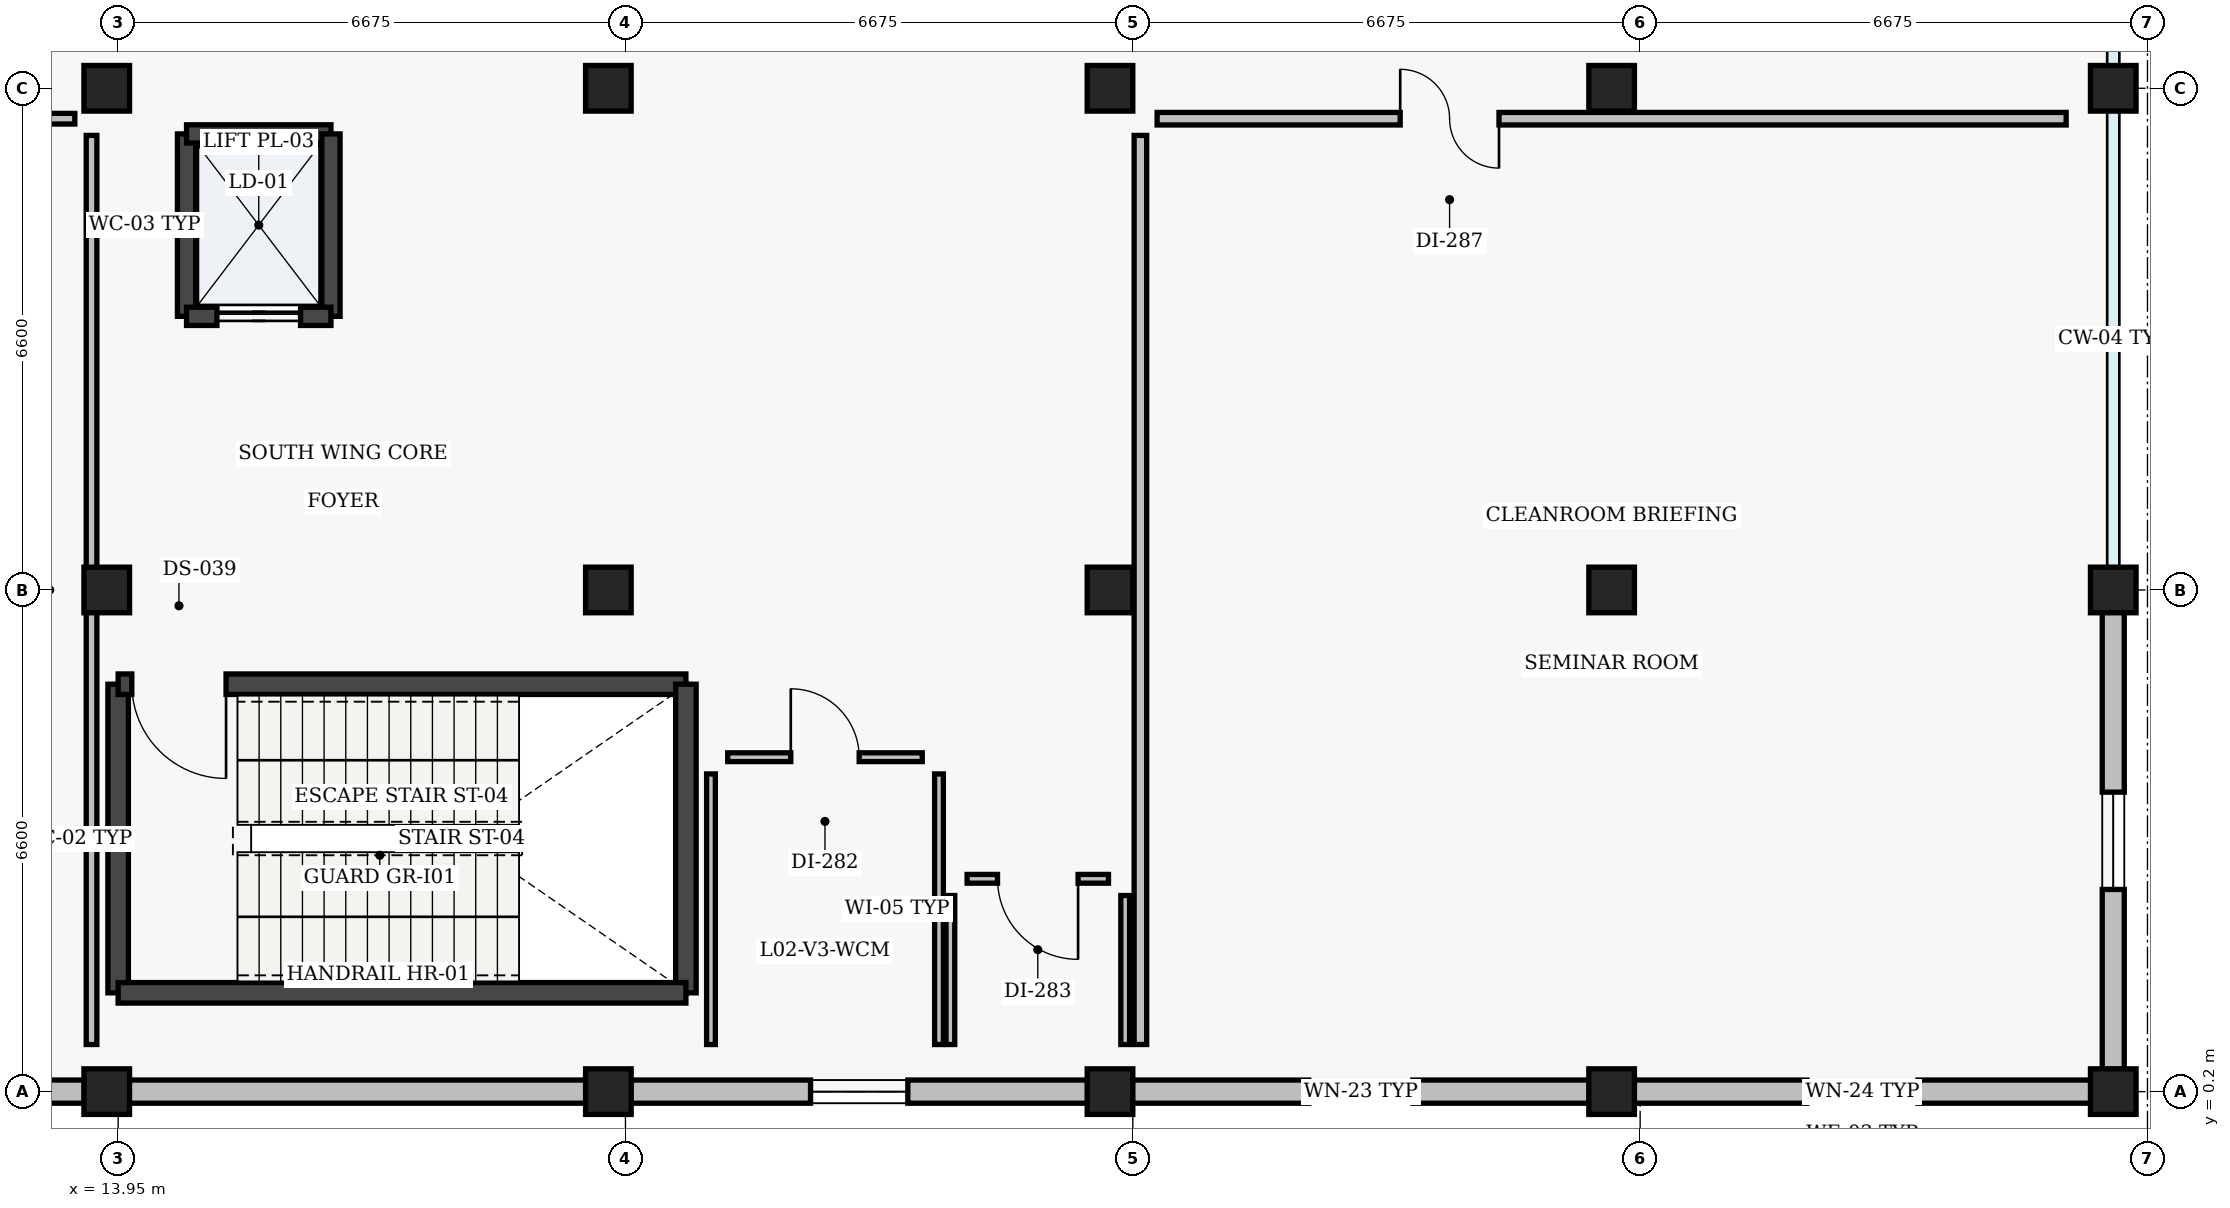
"""IFC4 building model, lengths in metres.
Left out: names, types, materials, properties, quantities, classifications, styles, units other than length and angle.
Written with IfcOpenShell. Run it as: python <this file> out.ifc"""

import sys

from ifc_helpers import new_model, si_unit, direction, frame, frame_2d, origin, origin_2d, place, context, subcontext, project, spatial, rectangle, extrude, element, fill, save


model = new_model("IFC4")
c1 = context("Model", 3, precision=1e-05, world=origin(), true_north=direction((0.0, 1.0)))
c2 = subcontext(c1, "Body", "Model", "MODEL_VIEW")
j1 = project(units=[si_unit("LENGTHUNIT", "METRE"), si_unit("PLANEANGLEUNIT", "RADIAN")], contexts=[c1])
p1 = place(None, origin())
s1 = spatial("IfcSite", under=j1, at=p1, CompositionType="ELEMENT")
p2 = place(p1, origin())
s2 = spatial("IfcBuilding", under=s1, at=p2, CompositionType="ELEMENT")
p3 = place(p2, frame((0.0, 0.0, 9.6)))
s3 = spatial("IfcBuildingStorey", under=s2, at=p3, CompositionType="ELEMENT", Elevation=9.6)
for number, where, z_axis, x_axis in (
    (1, (13.8, 0.2, 0.0), (0.0, 0.0, 1.0), (1.0, 0.0, 0.0)),
    (2, (13.8, 6.8, 0.0), (0.0, 0.0, 1.0), (1.0, 0.0, 0.0)),
    (3, (13.8, 13.4, 0.0), (0.0, 0.0, 1.0), (1.0, 0.0, 0.0)),
    (4, (20.4, 0.2, 0.0), (0.0, 0.0, 1.0), (1.0, 0.0, 0.0)),
    (5, (20.4, 6.8, 0.0), (0.0, 0.0, 1.0), (1.0, 0.0, 0.0)),
    (6, (20.4, 13.4, 0.0), (0.0, 0.0, 1.0), (1.0, 0.0, 0.0)),
    (7, (27.0, 0.2, 0.0), (0.0, 0.0, 1.0), (1.0, 0.0, 0.0)),
    (8, (27.0, 6.8, 0.0), (0.0, 0.0, 1.0), (1.0, 0.0, 0.0)),
    (9, (27.0, 13.4, 0.0), (0.0, 0.0, 1.0), (1.0, 0.0, 0.0)),
    (10, (33.6, 0.2, 0.0), (0.0, 0.0, 1.0), (1.0, 0.0, 0.0)),
    (11, (33.6, 6.8, 0.0), (0.0, 0.0, 1.0), (1.0, 0.0, 0.0)),
    (12, (33.6, 13.4, 0.0), (0.0, 0.0, 1.0), (1.0, 0.0, 0.0)),
    (13, (40.2, 0.2, 0.0), (0.0, 0.0, 1.0), (1.0, 0.0, 0.0)),
    (14, (40.2, 6.8, 0.0), (0.0, 0.0, 1.0), (1.0, 0.0, 0.0)),
    (15, (40.2, 13.4, 0.0), (0.0, 0.0, 1.0), (1.0, 0.0, 0.0)),
):
    element("IfcColumn", number, at=place(p3, frame(where, z_axis=z_axis, x_axis=x_axis)), inside=s3, PredefinedType="COLUMN", context=c2, shape_type="SweptSolid", body=[
        extrude(rectangle(XDim=0.6, YDim=0.6, at=origin_2d()), origin(), (0.0, 0.0, 1.0), 4.28),
    ])
p4 = place(p3, frame((40.2, 6.505, 0.0), z_axis=(0.0, 0.0, 1.0), x_axis=(0.0, -1.0, 0.0)))
e16 = element("IfcWall", 16, at=p4, inside=s3, PredefinedType="STANDARD", context=c2, shape_type="SweptSolid", body=[
    extrude(rectangle(XDim=6.01, YDim=0.29, at=frame_2d((3.005, 0.0))), origin(), (0.0, 0.0, 1.0), 3.815),
])
p5 = place(p4, frame((2.365, 0.0, 0.95)))
e17 = element("IfcOpeningElement", 17, at=p5, cuts=e16, PredefinedType="OPENING", context=c2, shape_type="SweptSolid", body=[
    extrude(rectangle(XDim=1.28, YDim=1.42, at=frame_2d((0.64, 0.71))), frame((0.0, 0.145, 0.0), z_axis=(0.0, -1.0, 0.0), x_axis=(1.0, 0.0, 0.0)), (0.0, 0.0, 1.0), 0.29),
])
p6 = place(p3, frame((39.905, 0.2, 0.0), z_axis=(0.0, 0.0, 1.0), x_axis=(-1.0, 0.0, 0.0)))
e18 = element("IfcWall", 18, at=p6, inside=s3, PredefinedType="STANDARD", context=c2, shape_type="SweptSolid", body=[
    extrude(rectangle(XDim=6.01, YDim=0.305, at=frame_2d((3.005, 0.0))), origin(), (0.0, 0.0, 1.0), 3.815),
])
p7 = place(p6, frame((2.275, 0.0, 0.95)))
e19 = element("IfcOpeningElement", 19, at=p7, cuts=e18, PredefinedType="OPENING", context=c2, shape_type="SweptSolid", body=[
    extrude(rectangle(XDim=1.46, YDim=1.44, at=frame_2d((0.73, 0.72))), frame((0.0, 0.152, 0.0), z_axis=(0.0, -1.0, 0.0), x_axis=(1.0, 0.0, 0.0)), (0.0, 0.0, 1.0), 0.305),
])
p8 = place(p3, frame((33.305, 0.2, 0.0), z_axis=(0.0, 0.0, 1.0), x_axis=(-1.0, 0.0, 0.0)))
e20 = element("IfcWall", 20, at=p8, inside=s3, PredefinedType="STANDARD", context=c2, shape_type="SweptSolid", body=[
    extrude(rectangle(XDim=6.01, YDim=0.305, at=frame_2d((3.005, 0.0))), origin(), (0.0, 0.0, 1.0), 3.815),
])
p9 = place(p8, frame((2.32, 0.0, 0.95)))
e21 = element("IfcOpeningElement", 21, at=p9, cuts=e20, PredefinedType="OPENING", context=c2, shape_type="SweptSolid", body=[
    extrude(rectangle(XDim=1.37, YDim=1.42, at=frame_2d((0.685, 0.71))), frame((0.0, 0.152, 0.0), z_axis=(0.0, -1.0, 0.0), x_axis=(1.0, 0.0, 0.0)), (0.0, 0.0, 1.0), 0.305),
])
p10 = place(p3, frame((26.705, 0.2, 0.0), z_axis=(0.0, 0.0, 1.0), x_axis=(-1.0, 0.0, 0.0)))
e22 = element("IfcWall", 22, at=p10, inside=s3, PredefinedType="STANDARD", context=c2, shape_type="SweptSolid", body=[
    extrude(rectangle(XDim=6.01, YDim=0.305, at=frame_2d((3.005, 0.0))), origin(), (0.0, 0.0, 1.0), 3.815),
])
p11 = place(p10, frame((2.365, 0.0, 0.95)))
e23 = element("IfcOpeningElement", 23, at=p11, cuts=e22, PredefinedType="OPENING", context=c2, shape_type="SweptSolid", body=[
    extrude(rectangle(XDim=1.28, YDim=1.4, at=frame_2d((0.64, 0.7))), frame((0.0, 0.152, 0.0), z_axis=(0.0, -1.0, 0.0), x_axis=(1.0, 0.0, 0.0)), (0.0, 0.0, 1.0), 0.305),
])
p12 = place(p3, frame((20.105, 0.2, 0.0), z_axis=(0.0, 0.0, 1.0), x_axis=(-1.0, 0.0, 0.0)))
e24 = element("IfcWall", 24, at=p12, inside=s3, PredefinedType="STANDARD", context=c2, shape_type="SweptSolid", body=[
    extrude(rectangle(XDim=6.01, YDim=0.305, at=frame_2d((3.005, 0.0))), origin(), (0.0, 0.0, 1.0), 3.815),
])
p13 = place(p3, frame((13.505, 0.2, 0.0), z_axis=(0.0, 0.0, 1.0), x_axis=(-1.0, 0.0, 0.0)))
e25 = element("IfcWall", 25, at=p13, inside=s3, PredefinedType="STANDARD", context=c2, shape_type="SweptSolid", body=[
    extrude(rectangle(XDim=6.01, YDim=0.305, at=frame_2d((3.005, 0.0))), origin(), (0.0, 0.0, 1.0), 3.815),
])
p14 = place(p13, frame((1.98, 0.0, 0.95)))
e26 = element("IfcOpeningElement", 26, at=p14, cuts=e25, PredefinedType="OPENING", context=c2, shape_type="SweptSolid", body=[
    extrude(rectangle(XDim=2.05, YDim=1.7, at=frame_2d((1.025, 0.85))), frame((0.0, 0.152, 0.0), z_axis=(0.0, -1.0, 0.0), x_axis=(1.0, 0.0, 0.0)), (0.0, 0.0, 1.0), 0.305),
])
p15 = place(p3, frame((13.95, 1.5, 0.0), z_axis=(0.0, 0.0, 1.0), x_axis=(0.0, 1.0, 0.0)))
e27 = element("IfcWall", 27, at=p15, inside=s3, PredefinedType="SHEAR", context=c2, shape_type="SweptSolid", body=[
    extrude(rectangle(XDim=4.06, YDim=0.27, at=frame_2d((2.03, 0.0))), origin(), (0.0, 0.0, 1.0), 4.28),
])
p16 = place(p3, frame((13.95, 5.56, 0.0), z_axis=(0.0, 0.0, 1.0), x_axis=(1.0, 0.0, 0.0)))
e28 = element("IfcWall", 28, at=p16, inside=s3, PredefinedType="SHEAR", context=c2, shape_type="SweptSolid", body=[
    extrude(rectangle(XDim=7.47, YDim=0.27, at=frame_2d((3.735, 0.0))), origin(), (0.0, 0.0, 1.0), 4.28),
])
p17 = place(p16, frame((0.18, 0.0, 0.0)))
e29 = element("IfcOpeningElement", 29, at=p17, cuts=e28, PredefinedType="OPENING", context=c2, shape_type="SweptSolid", body=[
    extrude(rectangle(XDim=1.24, YDim=2.15, at=frame_2d((0.62, 1.075))), frame((0.0, 0.135, 0.0), z_axis=(0.0, -1.0, 0.0), x_axis=(1.0, 0.0, 0.0)), (0.0, 0.0, 1.0), 0.27),
])
p18 = place(p3, frame((21.42, 5.56, 0.0), z_axis=(0.0, 0.0, 1.0), x_axis=(0.0, -1.0, 0.0)))
e30 = element("IfcWall", 30, at=p18, inside=s3, PredefinedType="SHEAR", context=c2, shape_type="SweptSolid", body=[
    extrude(rectangle(XDim=4.06, YDim=0.27, at=frame_2d((2.03, 0.0))), origin(), (0.0, 0.0, 1.0), 4.28),
])
p19 = place(p3, frame((21.42, 1.5, 0.0), z_axis=(0.0, 0.0, 1.0), x_axis=(-1.0, 0.0, 0.0)))
e31 = element("IfcWall", 31, at=p19, inside=s3, PredefinedType="SHEAR", context=c2, shape_type="SweptSolid", body=[
    extrude(rectangle(XDim=7.47, YDim=0.27, at=frame_2d((3.735, 0.0))), origin(), (0.0, 0.0, 1.0), 4.28),
])
p20 = place(p3, frame((14.85, 10.4, 0.0), z_axis=(0.0, 0.0, 1.0), x_axis=(0.0, 1.0, 0.0)))
e32 = element("IfcWall", 32, at=p20, inside=s3, PredefinedType="SHEAR", context=c2, shape_type="SweptSolid", body=[
    extrude(rectangle(XDim=2.4, YDim=0.24, at=frame_2d((1.2, 0.0))), origin(), (0.0, 0.0, 1.0), 4.28),
])
p21 = place(p3, frame((14.85, 12.8, 0.0), z_axis=(0.0, 0.0, 1.0), x_axis=(1.0, 0.0, 0.0)))
e33 = element("IfcWall", 33, at=p21, inside=s3, PredefinedType="SHEAR", context=c2, shape_type="SweptSolid", body=[
    extrude(rectangle(XDim=1.9, YDim=0.24, at=frame_2d((0.95, 0.0))), origin(), (0.0, 0.0, 1.0), 4.28),
])
p22 = place(p3, frame((16.75, 12.8, 0.0), z_axis=(0.0, 0.0, 1.0), x_axis=(0.0, -1.0, 0.0)))
e34 = element("IfcWall", 34, at=p22, inside=s3, PredefinedType="SHEAR", context=c2, shape_type="SweptSolid", body=[
    extrude(rectangle(XDim=2.4, YDim=0.24, at=frame_2d((1.2, 0.0))), origin(), (0.0, 0.0, 1.0), 4.28),
])
p23 = place(p3, frame((16.75, 10.4, 0.0), z_axis=(0.0, 0.0, 1.0), x_axis=(-1.0, 0.0, 0.0)))
e35 = element("IfcWall", 35, at=p23, inside=s3, PredefinedType="SHEAR", context=c2, shape_type="SweptSolid", body=[
    extrude(rectangle(XDim=1.9, YDim=0.24, at=frame_2d((0.95, 0.0))), origin(), (0.0, 0.0, 1.0), 4.28),
])
p24 = place(p23, frame((0.4, 0.0, 0.0)))
e36 = element("IfcOpeningElement", 36, at=p24, cuts=e35, PredefinedType="OPENING", context=c2, shape_type="SweptSolid", body=[
    extrude(rectangle(XDim=1.1, YDim=2.2, at=frame_2d((0.55, 1.1))), frame((0.0, 0.12, 0.0), z_axis=(0.0, -1.0, 0.0), x_axis=(1.0, 0.0, 0.0)), (0.0, 0.0, 1.0), 0.24),
])
p25 = place(p3, frame((24.75, 0.82, 0.0), z_axis=(0.0, 0.0, 1.0), x_axis=(0.0, 1.0, 0.0)))
e37 = element("IfcWall", 37, at=p25, inside=s3, PredefinedType="PARTITIONING", context=c2, shape_type="SweptSolid", body=[
    extrude(rectangle(XDim=3.56, YDim=0.115, at=frame_2d((1.78, 0.0))), origin(), (0.0, 0.0, 1.0), 3.95),
])
p26 = place(p3, frame((24.53, 4.6, 0.0), z_axis=(0.0, 0.0, 1.0), x_axis=(-1.0, 0.0, 0.0)))
e38 = element("IfcWall", 38, at=p26, inside=s3, PredefinedType="PARTITIONING", context=c2, shape_type="SweptSolid", body=[
    extrude(rectangle(XDim=2.56, YDim=0.115, at=frame_2d((1.28, 0.0))), origin(), (0.0, 0.0, 1.0), 3.95),
])
p27 = place(p26, frame((0.83, 0.0, 0.0)))
e39 = element("IfcOpeningElement", 39, at=p27, cuts=e38, PredefinedType="OPENING", context=c2, shape_type="SweptSolid", body=[
    extrude(rectangle(XDim=0.9, YDim=2.1, at=frame_2d((0.45, 1.05))), frame((0.0, 0.058, 0.0), z_axis=(0.0, -1.0, 0.0), x_axis=(1.0, 0.0, 0.0)), (0.0, 0.0, 1.0), 0.115),
])
p28 = place(p3, frame((21.75, 4.38, 0.0), z_axis=(0.0, 0.0, 1.0), x_axis=(0.0, -1.0, 0.0)))
e40 = element("IfcWall", 40, at=p28, inside=s3, PredefinedType="PARTITIONING", context=c2, shape_type="SweptSolid", body=[
    extrude(rectangle(XDim=3.56, YDim=0.115, at=frame_2d((1.78, 0.0))), origin(), (0.0, 0.0, 1.0), 3.95),
])
p29 = place(p3, frame((27.2, 0.82, 0.0), z_axis=(0.0, 0.0, 1.0), x_axis=(0.0, 1.0, 0.0)))
e41 = element("IfcWall", 41, at=p29, inside=s3, PredefinedType="PARTITIONING", context=c2, shape_type="SweptSolid", body=[
    extrude(rectangle(XDim=1.96, YDim=0.115, at=frame_2d((0.98, 0.0))), origin(), (0.0, 0.0, 1.0), 3.615),
])
p30 = place(p3, frame((26.98, 3.0, 0.0), z_axis=(0.0, 0.0, 1.0), x_axis=(-1.0, 0.0, 0.0)))
e42 = element("IfcWall", 42, at=p30, inside=s3, PredefinedType="PARTITIONING", context=c2, shape_type="SweptSolid", body=[
    extrude(rectangle(XDim=1.86, YDim=0.115, at=frame_2d((0.93, 0.0))), origin(), (0.0, 0.0, 1.0), 3.95),
])
p31 = place(p30, frame((0.4, 0.0, 0.0)))
e43 = element("IfcOpeningElement", 43, at=p31, cuts=e42, PredefinedType="OPENING", context=c2, shape_type="SweptSolid", body=[
    extrude(rectangle(XDim=1.06, YDim=2.12, at=frame_2d((0.53, 1.06))), frame((0.0, 0.058, 0.0), z_axis=(0.0, -1.0, 0.0), x_axis=(1.0, 0.0, 0.0)), (0.0, 0.0, 1.0), 0.115),
])
p32 = place(p3, frame((24.9, 2.78, 0.0), z_axis=(0.0, 0.0, 1.0), x_axis=(0.0, -1.0, 0.0)))
e44 = element("IfcWall", 44, at=p32, inside=s3, PredefinedType="PARTITIONING", context=c2, shape_type="SweptSolid", body=[
    extrude(rectangle(XDim=1.96, YDim=0.115, at=frame_2d((0.98, 0.0))), origin(), (0.0, 0.0, 1.0), 3.95),
])
p33 = place(p3, frame((13.6, 0.82, 0.0), z_axis=(0.0, 0.0, 1.0), x_axis=(0.0, 1.0, 0.0)))
e45 = element("IfcWall", 45, at=p33, inside=s3, PredefinedType="PARTITIONING", context=c2, shape_type="SweptSolid", body=[
    extrude(rectangle(XDim=11.96, YDim=0.14, at=frame_2d((5.98, 0.0))), origin(), (0.0, 0.0, 1.0), 3.615),
])
p34 = place(p3, frame((13.38, 13.0, 0.0), z_axis=(0.0, 0.0, 1.0), x_axis=(-1.0, 0.0, 0.0)))
e46 = element("IfcWall", 46, at=p34, inside=s3, PredefinedType="PARTITIONING", context=c2, shape_type="SweptSolid", body=[
    extrude(rectangle(XDim=12.16, YDim=0.14, at=frame_2d((6.08, 0.0))), origin(), (0.0, 0.0, 1.0), 3.95),
])
p35 = place(p34, frame((4.488, 0.0, 0.0)))
e47 = element("IfcOpeningElement", 47, at=p35, cuts=e46, PredefinedType="OPENING", context=c2, shape_type="SweptSolid", body=[
    extrude(rectangle(XDim=0.94, YDim=2.12, at=frame_2d((0.47, 1.06))), frame((0.0, 0.07, 0.0), z_axis=(0.0, -1.0, 0.0), x_axis=(1.0, 0.0, 0.0)), (0.0, 0.0, 1.0), 0.14),
])
p36 = place(p3, frame((39.58, 13.0, 0.0), z_axis=(0.0, 0.0, 1.0), x_axis=(-1.0, 0.0, 0.0)))
e48 = element("IfcWall", 48, at=p36, inside=s3, PredefinedType="PARTITIONING", context=c2, shape_type="SweptSolid", body=[
    extrude(rectangle(XDim=11.96, YDim=0.165, at=frame_2d((5.98, 0.0))), origin(), (0.0, 0.0, 1.0), 3.95),
])
p37 = place(p36, frame((7.462, 0.0, 0.0)))
e49 = element("IfcOpeningElement", 49, at=p37, cuts=e48, PredefinedType="OPENING", context=c2, shape_type="SweptSolid", body=[
    extrude(rectangle(XDim=1.3, YDim=2.18, at=frame_2d((0.65, 1.09))), frame((0.0, 0.083, 0.0), z_axis=(0.0, -1.0, 0.0), x_axis=(1.0, 0.0, 0.0)), (0.0, 0.0, 1.0), 0.165),
])
p38 = place(p3, frame((27.4, 12.78, 0.0), z_axis=(0.0, 0.0, 1.0), x_axis=(0.0, -1.0, 0.0)))
e50 = element("IfcWall", 50, at=p38, inside=s3, PredefinedType="PARTITIONING", context=c2, shape_type="SweptSolid", body=[
    extrude(rectangle(XDim=11.96, YDim=0.165, at=frame_2d((5.98, 0.0))), origin(), (0.0, 0.0, 1.0), 3.95),
])
p39 = place(p5, origin())
e51 = element("IfcWindow", 51, at=p39, inside=s3, PartitioningType="SINGLE_PANEL", PredefinedType="WINDOW", context=c2, shape_type="SweptSolid", body=[
    extrude(rectangle(XDim=1.28, YDim=1.42, at=frame_2d((0.64, 0.71))), frame((0.0, 0.03, 0.0), z_axis=(0.0, -1.0, 0.0), x_axis=(1.0, 0.0, 0.0)), (0.0, 0.0, 1.0), 0.06),
])
fill(e17, e51)
p40 = place(p7, origin())
e52 = element("IfcWindow", 52, at=p40, inside=s3, PartitioningType="SINGLE_PANEL", PredefinedType="WINDOW", context=c2, shape_type="SweptSolid", body=[
    extrude(rectangle(XDim=1.46, YDim=1.44, at=frame_2d((0.73, 0.72))), frame((0.0, 0.03, 0.0), z_axis=(0.0, -1.0, 0.0), x_axis=(1.0, 0.0, 0.0)), (0.0, 0.0, 1.0), 0.06),
])
fill(e19, e52)
p41 = place(p9, origin())
e53 = element("IfcWindow", 53, at=p41, inside=s3, PartitioningType="SINGLE_PANEL", PredefinedType="WINDOW", context=c2, shape_type="SweptSolid", body=[
    extrude(rectangle(XDim=1.37, YDim=1.42, at=frame_2d((0.685, 0.71))), frame((0.0, 0.03, 0.0), z_axis=(0.0, -1.0, 0.0), x_axis=(1.0, 0.0, 0.0)), (0.0, 0.0, 1.0), 0.06),
])
fill(e21, e53)
p42 = place(p11, origin())
e54 = element("IfcWindow", 54, at=p42, inside=s3, PartitioningType="SINGLE_PANEL", PredefinedType="WINDOW", context=c2, shape_type="SweptSolid", body=[
    extrude(rectangle(XDim=1.28, YDim=1.4, at=frame_2d((0.64, 0.7))), frame((0.0, 0.03, 0.0), z_axis=(0.0, -1.0, 0.0), x_axis=(1.0, 0.0, 0.0)), (0.0, 0.0, 1.0), 0.06),
])
fill(e23, e54)
p43 = place(p17, origin())
e55 = element("IfcDoor", 55, at=p43, inside=s3, OperationType="SINGLE_SWING_RIGHT", PredefinedType="DOOR", context=c2, shape_type="SweptSolid", body=[
    extrude(rectangle(XDim=1.24, YDim=2.15, at=frame_2d((0.62, 1.075))), frame((0.0, 0.025, 0.0), z_axis=(0.0, -1.0, 0.0), x_axis=(1.0, 0.0, 0.0)), (0.0, 0.0, 1.0), 0.05),
])
fill(e29, e55)
p44 = place(p24, origin())
e56 = element("IfcDoor", 56, at=p44, inside=s3, OperationType="SLIDING_TO_LEFT", PredefinedType="DOOR", context=c2, shape_type="SweptSolid", body=[
    extrude(rectangle(XDim=1.1, YDim=2.2, at=frame_2d((0.55, 1.1))), frame((0.0, 0.025, 0.0), z_axis=(0.0, -1.0, 0.0), x_axis=(1.0, 0.0, 0.0)), (0.0, 0.0, 1.0), 0.05),
])
fill(e36, e56)
p45 = place(p27, origin())
e57 = element("IfcDoor", 57, at=p45, inside=s3, OperationType="SINGLE_SWING_RIGHT", PredefinedType="DOOR", context=c2, shape_type="SweptSolid", body=[
    extrude(rectangle(XDim=0.9, YDim=2.1, at=frame_2d((0.45, 1.05))), frame((0.0, 0.025, 0.0), z_axis=(0.0, -1.0, 0.0), x_axis=(1.0, 0.0, 0.0)), (0.0, 0.0, 1.0), 0.05),
])
fill(e39, e57)
p46 = place(p31, origin())
e58 = element("IfcDoor", 58, at=p46, inside=s3, OperationType="SINGLE_SWING_LEFT", PredefinedType="DOOR", context=c2, shape_type="SweptSolid", body=[
    extrude(rectangle(XDim=1.06, YDim=2.12, at=frame_2d((0.53, 1.06))), frame((0.0, 0.025, 0.0), z_axis=(0.0, -1.0, 0.0), x_axis=(1.0, 0.0, 0.0)), (0.0, 0.0, 1.0), 0.05),
])
fill(e43, e58)
p47 = place(p37, origin())
e59 = element("IfcDoor", 59, at=p47, inside=s3, OperationType="DOUBLE_DOOR_SINGLE_SWING", PredefinedType="DOOR", context=c2, shape_type="SweptSolid", body=[
    extrude(rectangle(XDim=1.3, YDim=2.18, at=frame_2d((0.65, 1.09))), frame((0.0, 0.025, 0.0), z_axis=(0.0, -1.0, 0.0), x_axis=(1.0, 0.0, 0.0)), (0.0, 0.0, 1.0), 0.05),
])
fill(e49, e59)
save(model, sys.argv[1])
